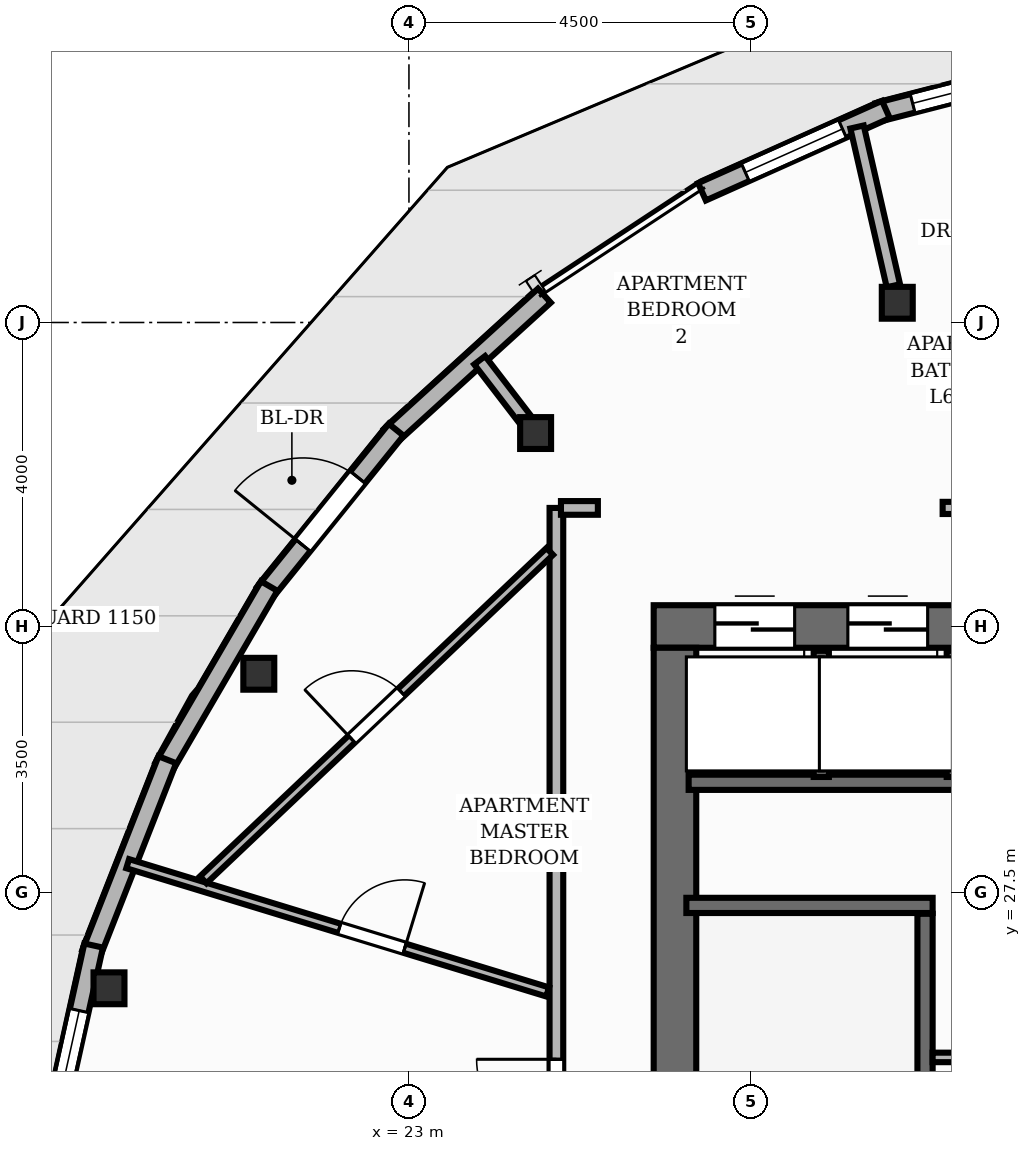
"""IFC4 building model, lengths in metres.
Left out: names, types, materials, properties, quantities, classifications, styles, units other than length and angle.
Written with IfcOpenShell. Run it as: python <this file> out.ifc"""

import sys

from ifc_helpers import new_model, si_unit, direction, frame, frame_2d, origin, origin_2d, place, context, subcontext, project, spatial, rectangle, i_section, extrude, element, fill, save


model = new_model("IFC4")
c1 = context("Model", 3, precision=1e-05, world=origin(), true_north=direction((0.0, 1.0)))
c2 = subcontext(c1, "Body", "Model", "MODEL_VIEW")
j1 = project(units=[si_unit("LENGTHUNIT", "METRE"), si_unit("PLANEANGLEUNIT", "RADIAN")], contexts=[c1])
p1 = place(None, origin())
s1 = spatial("IfcSite", under=j1, at=p1, CompositionType="ELEMENT")
p2 = place(p1, origin())
s2 = spatial("IfcBuilding", under=s1, at=p2, CompositionType="ELEMENT")
p3 = place(p2, frame((0.0, 0.0, 223.84)))
s3 = spatial("IfcBuildingStorey", under=s2, at=p3, CompositionType="ELEMENT", Elevation=223.84)
p4 = place(p3, frame((26.22, 31.0, 0.0), z_axis=(0.0, 0.0, 1.0), x_axis=(1.0, 0.0, 0.0)))
e1 = element("IfcWall", 1, at=p4, inside=s3, PredefinedType="SHEAR", context=c2, shape_type="SweptSolid", body=[
    extrude(rectangle(XDim=11.56, YDim=0.56, at=frame_2d((5.78, 0.0))), origin(), (0.0, 0.0, 1.0), 3.2),
])
p5 = place(p4, frame((8.18, 0.0, 0.0)))
e2 = element("IfcOpeningElement", 2, at=p5, cuts=e1, PredefinedType="OPENING", context=c2, shape_type="SweptSolid", body=[
    extrude(rectangle(XDim=1.1, YDim=2.15, at=frame_2d((0.55, 1.075))), frame((0.0, 0.29, 0.0), z_axis=(0.0, -1.0, 0.0), x_axis=(1.0, 0.0, 0.0)), (0.0, 0.0, 1.0), 0.58),
])
p6 = place(p4, frame((0.805, 0.0, 0.0)))
e3 = element("IfcOpeningElement", 3, at=p6, cuts=e1, PredefinedType="OPENING", context=c2, shape_type="SweptSolid", body=[
    extrude(rectangle(XDim=1.05, YDim=2.15, at=frame_2d((0.525, 1.075))), frame((0.0, 0.29, 0.0), z_axis=(0.0, -1.0, 0.0), x_axis=(1.0, 0.0, 0.0)), (0.0, 0.0, 1.0), 0.58),
])
p7 = place(p4, frame((2.555, 0.0, 0.0)))
e4 = element("IfcOpeningElement", 4, at=p7, cuts=e1, PredefinedType="OPENING", context=c2, shape_type="SweptSolid", body=[
    extrude(rectangle(XDim=1.05, YDim=2.15, at=frame_2d((0.525, 1.075))), frame((0.0, 0.29, 0.0), z_axis=(0.0, -1.0, 0.0), x_axis=(1.0, 0.0, 0.0)), (0.0, 0.0, 1.0), 0.58),
])
p8 = place(p4, frame((4.305, 0.0, 0.0)))
e5 = element("IfcOpeningElement", 5, at=p8, cuts=e1, PredefinedType="OPENING", context=c2, shape_type="SweptSolid", body=[
    extrude(rectangle(XDim=1.05, YDim=2.15, at=frame_2d((0.525, 1.075))), frame((0.0, 0.29, 0.0), z_axis=(0.0, -1.0, 0.0), x_axis=(1.0, 0.0, 0.0)), (0.0, 0.0, 1.0), 0.58),
])
p9 = place(p3, frame((26.5, 17.28, 0.0), z_axis=(0.0, 0.0, 1.0), x_axis=(0.0, 1.0, 0.0)))
e6 = element("IfcWall", 6, at=p9, inside=s3, PredefinedType="SHEAR", context=c2, shape_type="SweptSolid", body=[
    extrude(rectangle(XDim=13.44, YDim=0.56, at=frame_2d((6.72, 0.0))), origin(), (0.0, 0.0, 1.0), 3.2),
])
for number, where, z_axis, x_axis in (
    (7, (29.425, 35.26, 0.0), (0.0, 0.0, 1.0), (1.0, 0.0, 0.0)),
    (8, (24.667, 33.545, 0.0), (0.0, 0.0, 1.0), (1.0, 0.0, 0.0)),
    (9, (21.025, 30.378, 0.0), (0.0, 0.0, 1.0), (1.0, 0.0, 0.0)),
    (10, (19.054, 26.24, 0.0), (0.0, 0.0, 1.0), (1.0, 0.0, 0.0)),
):
    element("IfcColumn", number, at=place(p3, frame(where, z_axis=z_axis, x_axis=x_axis)), inside=s3, PredefinedType="COLUMN", context=c2, shape_type="SweptSolid", body=[
        extrude(i_section(OverallWidth=0.407, OverallDepth=0.419, WebThickness=0.031, FlangeThickness=0.049, at=origin_2d()), origin(), (0.0, 0.0, 1.0), 3.2),
    ])
p10 = place(p3, frame((29.171, 37.766, 0.0), z_axis=(0.0, 0.0, 1.0), x_axis=(0.968423445169, 0.249311112562, 0.0)))
e11 = element("IfcWall", 11, at=p10, inside=s3, PredefinedType="SOLIDWALL", context=c2, shape_type="SweptSolid", body=[
    extrude(rectangle(XDim=2.592, YDim=0.25, at=frame_2d((1.296, 0.0))), origin(), (0.0, 0.0, 1.0), 2.96),
])
p11 = place(p10, frame((0.471, 0.0, 0.85)))
e12 = element("IfcOpeningElement", 12, at=p11, cuts=e11, PredefinedType="OPENING", context=c2, shape_type="SweptSolid", body=[
    extrude(rectangle(XDim=1.65, YDim=1.55, at=frame_2d((0.825, 0.775))), frame((0.0, 0.135, 0.0), z_axis=(0.0, -1.0, 0.0), x_axis=(1.0, 0.0, 0.0)), (0.0, 0.0, 1.0), 0.27),
])
p12 = place(p3, frame((26.855, 36.719, 0.0), z_axis=(0.0, 0.0, 1.0), x_axis=(0.912779399898, 0.408452894617, 0.0)))
e13 = element("IfcWall", 13, at=p12, inside=s3, PredefinedType="SOLIDWALL", context=c2, shape_type="SweptSolid", body=[
    extrude(rectangle(XDim=2.651, YDim=0.25, at=frame_2d((1.325, 0.0))), origin(), (0.0, 0.0, 1.0), 2.96),
])
p13 = place(p12, frame((0.625, 0.0, 0.85)))
e14 = element("IfcOpeningElement", 14, at=p13, cuts=e13, PredefinedType="OPENING", context=c2, shape_type="SweptSolid", body=[
    extrude(rectangle(XDim=1.4, YDim=1.52, at=frame_2d((0.7, 0.76))), frame((0.0, 0.135, 0.0), z_axis=(0.0, -1.0, 0.0), x_axis=(1.0, 0.0, 0.0)), (0.0, 0.0, 1.0), 0.27),
])
p14 = place(p3, frame((22.757, 33.51, 0.0), z_axis=(0.0, 0.0, 1.0), x_axis=(0.739366950434, 0.673302690182, 0.0)))
e15 = element("IfcWall", 15, at=p14, inside=s3, PredefinedType="SOLIDWALL", context=c2, shape_type="SweptSolid", body=[
    extrude(rectangle(XDim=2.738, YDim=0.25, at=frame_2d((1.369, 0.0))), origin(), (0.0, 0.0, 1.0), 2.96),
])
p15 = place(p3, frame((21.1, 31.442, 0.0), z_axis=(0.0, 0.0, 1.0), x_axis=(0.628046541479, 0.778175778174, 0.0)))
e16 = element("IfcWall", 16, at=p15, inside=s3, PredefinedType="SOLIDWALL", context=c2, shape_type="SweptSolid", body=[
    extrude(rectangle(XDim=2.758, YDim=0.25, at=frame_2d((1.379, 0.0))), origin(), (0.0, 0.0, 1.0), 2.96),
])
p16 = place(p15, frame((0.804, 0.0, 0.0)))
e17 = element("IfcOpeningElement", 17, at=p16, cuts=e16, PredefinedType="OPENING", context=c2, shape_type="SweptSolid", body=[
    extrude(rectangle(XDim=1.15, YDim=2.2, at=frame_2d((0.575, 1.1))), frame((0.0, 0.135, 0.0), z_axis=(0.0, -1.0, 0.0), x_axis=(1.0, 0.0, 0.0)), (0.0, 0.0, 1.0), 0.27),
])
p17 = place(p3, frame((19.773, 29.149, 0.0), z_axis=(0.0, 0.0, 1.0), x_axis=(0.503177339128, 0.864183178144, 0.0)))
e18 = element("IfcWall", 18, at=p17, inside=s3, PredefinedType="SOLIDWALL", context=c2, shape_type="SweptSolid", body=[
    extrude(rectangle(XDim=2.758, YDim=0.25, at=frame_2d((1.379, 0.0))), origin(), (0.0, 0.0, 1.0), 2.96),
])
p18 = place(p3, frame((18.82, 26.698, 0.0), z_axis=(0.0, 0.0, 1.0), x_axis=(0.365588934877, 0.930776412838, 0.0)))
e19 = element("IfcWall", 19, at=p18, inside=s3, PredefinedType="SOLIDWALL", context=c2, shape_type="SweptSolid", body=[
    extrude(rectangle(XDim=2.739, YDim=0.25, at=frame_2d((1.369, 0.0))), origin(), (0.0, 0.0, 1.0), 2.577),
])
p19 = place(p3, frame((18.267, 24.164, 0.0), z_axis=(0.0, 0.0, 1.0), x_axis=(0.21633718885, 0.976318708579, 0.0)))
e20 = element("IfcWall", 20, at=p19, inside=s3, PredefinedType="SOLIDWALL", context=c2, shape_type="SweptSolid", body=[
    extrude(rectangle(XDim=2.702, YDim=0.25, at=frame_2d((1.351, 0.0))), origin(), (0.0, 0.0, 1.0), 2.577),
])
p20 = place(p19, frame((0.175, 0.0, 0.85)))
e21 = element("IfcOpeningElement", 21, at=p20, cuts=e20, PredefinedType="OPENING", context=c2, shape_type="SweptSolid", body=[
    extrude(rectangle(XDim=1.65, YDim=1.55, at=frame_2d((0.825, 0.775))), frame((0.0, 0.135, 0.0), z_axis=(0.0, -1.0, 0.0), x_axis=(1.0, 0.0, 0.0)), (0.0, 0.0, 1.0), 0.27),
])
p21 = place(p3, frame((29.79, 20.78, 0.0), z_axis=(0.0, 0.0, 1.0), x_axis=(0.0, 1.0, 0.0)))
e22 = element("IfcWall", 22, at=p21, inside=s3, PredefinedType="SHEAR", context=c2, shape_type="SweptSolid", body=[
    extrude(rectangle(XDim=6.44, YDim=0.2, at=frame_2d((3.22, 0.0))), origin(), (0.0, 0.0, 1.0), 3.2),
])
p22 = place(p3, frame((26.65, 27.33, 0.0), z_axis=(0.0, 0.0, 1.0), x_axis=(1.0, 0.0, 0.0)))
e23 = element("IfcWall", 23, at=p22, inside=s3, PredefinedType="SHEAR", context=c2, shape_type="SweptSolid", body=[
    extrude(rectangle(XDim=3.24, YDim=0.2, at=frame_2d((1.62, 0.0))), origin(), (0.0, 0.0, 1.0), 3.2),
])
p23 = place(p3, frame((26.68, 28.95, 0.0), z_axis=(0.0, 0.0, 1.0), x_axis=(1.0, 0.0, 0.0)))
e24 = element("IfcWall", 24, at=p23, inside=s3, PredefinedType="SHEAR", context=c2, shape_type="SweptSolid", body=[
    extrude(rectangle(XDim=5.24, YDim=0.2, at=frame_2d((2.62, 0.0))), origin(), (0.0, 0.0, 1.0), 3.2),
])
for number, where, z_axis, x_axis in (
    (25, (28.425, 29.02, 0.0), (0.0, 0.0, 1.0), (0.0, 1.0, 0.0)),
    (26, (30.175, 29.02, 0.0), (0.0, 0.0, 1.0), (0.0, 1.0, 0.0)),
):
    element("IfcWall", number, at=place(p3, frame(where, z_axis=z_axis, x_axis=x_axis)), inside=s3, PredefinedType="SHEAR", context=c2, shape_type="SweptSolid", body=[
        extrude(rectangle(XDim=1.66, YDim=0.2, at=frame_2d((0.83, 0.0))), origin(), (0.0, 0.0, 1.0), 3.2),
    ])
p24 = place(p3, frame((29.89, 25.33, 0.0), z_axis=(0.0, 0.0, 1.0), x_axis=(1.0, 0.0, 0.0)))
e27 = element("IfcWall", 27, at=p24, inside=s3, PredefinedType="PARTITIONING", context=c2, shape_type="SweptSolid", body=[
    extrude(rectangle(XDim=1.94, YDim=0.125, at=frame_2d((0.97, 0.0))), origin(), (0.0, 0.0, 1.0), 2.955),
])
p25 = place(p3, frame((29.374, 35.483, 0.0), z_axis=(0.0, 0.0, 1.0), x_axis=(-0.222945438732, 0.974830924493, 0.0)))
e28 = element("IfcWall", 28, at=p25, inside=s3, PredefinedType="PARTITIONING", context=c2, shape_type="SweptSolid", body=[
    extrude(rectangle(XDim=2.143, YDim=0.18, at=frame_2d((1.072, 0.0))), origin(), (0.0, 0.0, 1.0), 2.403),
])
p26 = place(p3, frame((24.527, 33.727, 0.0), z_axis=(0.0, 0.0, 1.0), x_axis=(-0.60918017505, 0.793031849503, 0.0)))
e29 = element("IfcWall", 29, at=p26, inside=s3, PredefinedType="PARTITIONING", context=c2, shape_type="SweptSolid", body=[
    extrude(rectangle(XDim=0.979, YDim=0.18, at=frame_2d((0.489, 0.0))), origin(), (0.0, 0.0, 1.0), 2.403),
])
p27 = place(p3, frame((30.022, 32.56, 0.0), z_axis=(0.0, 0.0, 1.0), x_axis=(1.0, 0.0, 0.0)))
e30 = element("IfcWall", 30, at=p27, inside=s3, PredefinedType="PLUMBINGWALL", context=c2, shape_type="SweptSolid", body=[
    extrude(rectangle(XDim=0.778, YDim=0.16, at=frame_2d((0.389, 0.0))), origin(), (0.0, 0.0, 1.0), 2.955),
])
p28 = place(p3, frame((24.94, 23.384, 0.0), z_axis=(0.0, 0.0, 1.0), x_axis=(0.0, 1.0, 0.0)))
e31 = element("IfcWall", 31, at=p28, inside=s3, PredefinedType="PARTITIONING", context=c2, shape_type="SweptSolid", body=[
    extrude(rectangle(XDim=9.177, YDim=0.18, at=frame_2d((4.588, 0.0))), origin(), (0.0, 0.0, 1.0), 2.955),
])
p29 = place(p28, frame((0.872, 0.0, 0.0)))
e32 = element("IfcOpeningElement", 32, at=p29, cuts=e31, PredefinedType="OPENING", context=c2, shape_type="SweptSolid", body=[
    extrude(rectangle(XDim=1.05, YDim=2.15, at=frame_2d((0.525, 1.075))), frame((0.0, 0.1, 0.0), z_axis=(0.0, -1.0, 0.0), x_axis=(1.0, 0.0, 0.0)), (0.0, 0.0, 1.0), 0.2),
])
p30 = place(p3, frame((25.0, 32.56, 0.0), z_axis=(0.0, 0.0, 1.0), x_axis=(1.0, 0.0, 0.0)))
e33 = element("IfcWall", 33, at=p30, inside=s3, PredefinedType="PARTITIONING", context=c2, shape_type="SweptSolid", body=[
    extrude(rectangle(XDim=0.486, YDim=0.18, at=frame_2d((0.243, 0.0))), origin(), (0.0, 0.0, 1.0), 2.955),
])
p31 = place(p3, frame((19.3, 27.879, 0.0), z_axis=(0.0, 0.0, 1.0), x_axis=(0.956379122361, -0.29212835246, 0.0)))
e34 = element("IfcWall", 34, at=p31, inside=s3, PredefinedType="PARTITIONING", context=c2, shape_type="SweptSolid", body=[
    extrude(rectangle(XDim=5.777, YDim=0.125, at=frame_2d((2.889, 0.0))), origin(), (0.0, 0.0, 1.0), 2.692),
])
p32 = place(p31, frame((2.91, 0.0, 0.0)))
e35 = element("IfcOpeningElement", 35, at=p32, cuts=e34, PredefinedType="OPENING", context=c2, shape_type="SweptSolid", body=[
    extrude(rectangle(XDim=0.9, YDim=2.1, at=frame_2d((0.45, 1.05))), frame((0.0, 0.073, 0.0), z_axis=(0.0, -1.0, 0.0), x_axis=(1.0, 0.0, 0.0)), (0.0, 0.0, 1.0), 0.145),
])
p33 = place(p3, frame((20.293, 27.667, 0.0), z_axis=(0.0, 0.0, 1.0), x_axis=(0.725799476315, 0.687906330965, 0.0)))
e36 = element("IfcWall", 36, at=p33, inside=s3, PredefinedType="PARTITIONING", context=c2, shape_type="SweptSolid", body=[
    extrude(rectangle(XDim=6.282, YDim=0.125, at=frame_2d((3.141, 0.0))), origin(), (0.0, 0.0, 1.0), 2.955),
])
p34 = place(p33, frame((2.691, 0.0, 0.0)))
e37 = element("IfcOpeningElement", 37, at=p34, cuts=e36, PredefinedType="OPENING", context=c2, shape_type="SweptSolid", body=[
    extrude(rectangle(XDim=0.9, YDim=2.1, at=frame_2d((0.45, 1.05))), frame((0.0, 0.073, 0.0), z_axis=(0.0, -1.0, 0.0), x_axis=(1.0, 0.0, 0.0)), (0.0, 0.0, 1.0), 0.145),
])
p35 = place(p16, origin())
e38 = element("IfcDoor", 38, at=p35, inside=s3, OperationType="SINGLE_SWING_LEFT", PredefinedType="DOOR", context=c2, shape_type="SweptSolid", body=[
    extrude(rectangle(XDim=1.15, YDim=2.2, at=frame_2d((0.575, 1.1))), frame((0.0, 0.025, 0.0), z_axis=(0.0, -1.0, 0.0), x_axis=(1.0, 0.0, 0.0)), (0.0, 0.0, 1.0), 0.05),
])
fill(e17, e38)
p36 = place(p11, origin())
e39 = element("IfcWindow", 39, at=p36, inside=s3, PartitioningType="SINGLE_PANEL", PredefinedType="WINDOW", context=c2, shape_type="SweptSolid", body=[
    extrude(rectangle(XDim=1.65, YDim=1.55, at=frame_2d((0.825, 0.775))), frame((0.0, 0.03, 0.0), z_axis=(0.0, -1.0, 0.0), x_axis=(1.0, 0.0, 0.0)), (0.0, 0.0, 1.0), 0.06),
])
fill(e12, e39)
p37 = place(p13, origin())
e40 = element("IfcWindow", 40, at=p37, inside=s3, PartitioningType="SINGLE_PANEL", PredefinedType="WINDOW", context=c2, shape_type="SweptSolid", body=[
    extrude(rectangle(XDim=1.4, YDim=1.52, at=frame_2d((0.7, 0.76))), frame((0.0, 0.03, 0.0), z_axis=(0.0, -1.0, 0.0), x_axis=(1.0, 0.0, 0.0)), (0.0, 0.0, 1.0), 0.06),
])
fill(e14, e40)
p38 = place(p20, origin())
e41 = element("IfcWindow", 41, at=p38, inside=s3, PartitioningType="SINGLE_PANEL", PredefinedType="WINDOW", context=c2, shape_type="SweptSolid", body=[
    extrude(rectangle(XDim=1.65, YDim=1.55, at=frame_2d((0.825, 0.775))), frame((0.0, 0.03, 0.0), z_axis=(0.0, -1.0, 0.0), x_axis=(1.0, 0.0, 0.0)), (0.0, 0.0, 1.0), 0.06),
])
fill(e21, e41)
p39 = place(p6, origin())
e42 = element("IfcDoor", 42, at=p39, inside=s3, OperationType="DOUBLE_DOOR_SLIDING", PredefinedType="DOOR", context=c2, shape_type="SweptSolid", body=[
    extrude(rectangle(XDim=1.05, YDim=2.15, at=frame_2d((0.525, 1.075))), frame((0.0, 0.025, 0.0), z_axis=(0.0, -1.0, 0.0), x_axis=(1.0, 0.0, 0.0)), (0.0, 0.0, 1.0), 0.05),
])
fill(e3, e42)
p40 = place(p7, origin())
e43 = element("IfcDoor", 43, at=p40, inside=s3, OperationType="DOUBLE_DOOR_SLIDING", PredefinedType="DOOR", context=c2, shape_type="SweptSolid", body=[
    extrude(rectangle(XDim=1.05, YDim=2.15, at=frame_2d((0.525, 1.075))), frame((0.0, 0.025, 0.0), z_axis=(0.0, -1.0, 0.0), x_axis=(1.0, 0.0, 0.0)), (0.0, 0.0, 1.0), 0.05),
])
fill(e4, e43)
p41 = place(p29, origin())
e44 = element("IfcDoor", 44, at=p41, inside=s3, OperationType="SINGLE_SWING_RIGHT", PredefinedType="DOOR", context=c2, shape_type="SweptSolid", body=[
    extrude(rectangle(XDim=1.05, YDim=2.15, at=frame_2d((0.525, 1.075))), frame((0.0, 0.025, 0.0), z_axis=(0.0, -1.0, 0.0), x_axis=(1.0, 0.0, 0.0)), (0.0, 0.0, 1.0), 0.05),
])
fill(e32, e44)
p42 = place(p32, origin())
e45 = element("IfcDoor", 45, at=p42, inside=s3, OperationType="SINGLE_SWING_RIGHT", PredefinedType="DOOR", context=c2, shape_type="SweptSolid", body=[
    extrude(rectangle(XDim=0.9, YDim=2.1, at=frame_2d((0.45, 1.05))), frame((0.0, 0.025, 0.0), z_axis=(0.0, -1.0, 0.0), x_axis=(1.0, 0.0, 0.0)), (0.0, 0.0, 1.0), 0.05),
])
fill(e35, e45)
p43 = place(p34, origin())
e46 = element("IfcDoor", 46, at=p43, inside=s3, OperationType="SINGLE_SWING_LEFT", PredefinedType="DOOR", context=c2, shape_type="SweptSolid", body=[
    extrude(rectangle(XDim=0.9, YDim=2.1, at=frame_2d((0.45, 1.05))), frame((0.0, 0.025, 0.0), z_axis=(0.0, -1.0, 0.0), x_axis=(1.0, 0.0, 0.0)), (0.0, 0.0, 1.0), 0.05),
])
fill(e37, e46)
save(model, sys.argv[1])
